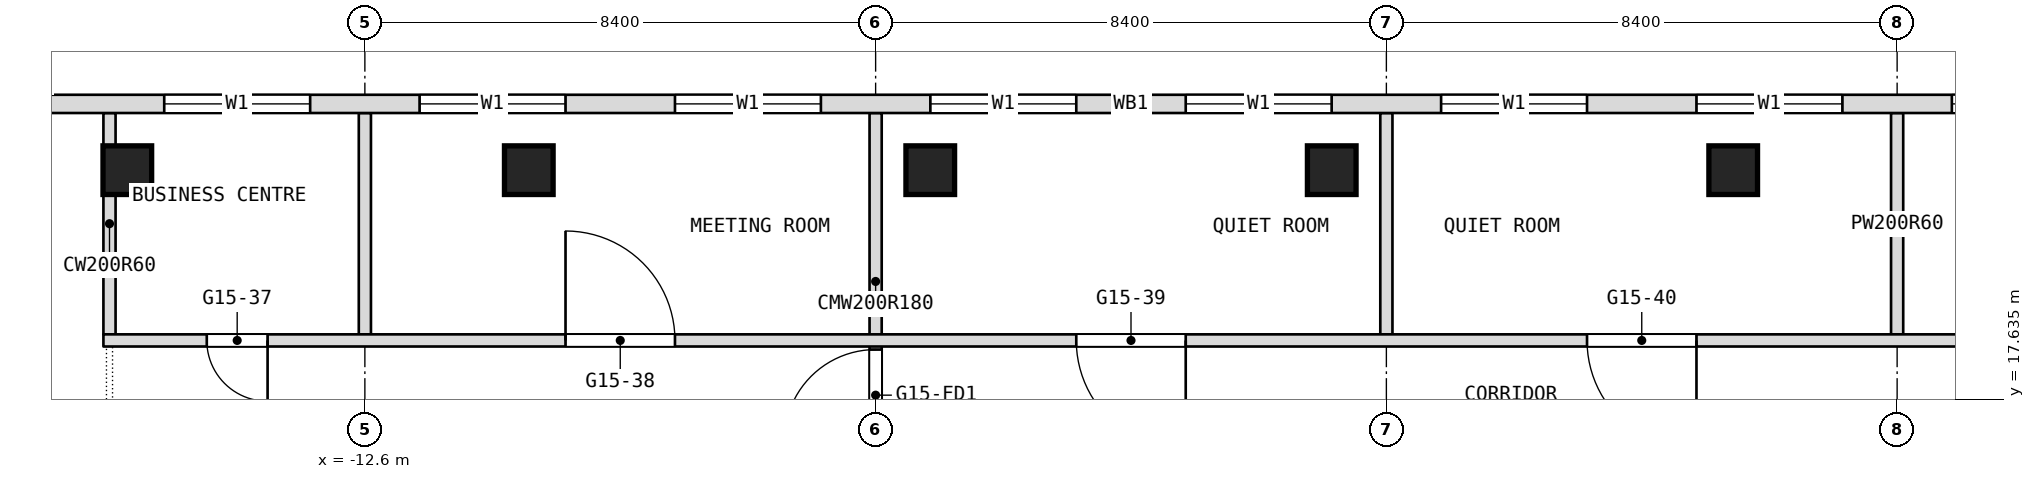
"""IFC4 building model, lengths in metres.
Left out: names, types, materials, properties, quantities, classifications, styles, units other than length and angle.
Written with IfcOpenShell. Run it as: python <this file> out.ifc"""

import sys

from ifc_helpers import new_model, si_unit, direction, frame, frame_2d, origin, origin_2d, place, context, subcontext, project, spatial, rectangle, extrude, element, fill, save


model = new_model("IFC4")
c1 = context("Model", 3, precision=1e-05, world=origin(), true_north=direction((0.0, 1.0)))
c2 = subcontext(c1, "Body", "Model", "MODEL_VIEW")
j1 = project(units=[si_unit("LENGTHUNIT", "METRE"), si_unit("PLANEANGLEUNIT", "RADIAN")], contexts=[c1])
p1 = place(None, origin())
s1 = spatial("IfcSite", under=j1, at=p1, CompositionType="ELEMENT")
p2 = place(p1, origin())
s2 = spatial("IfcBuilding", under=s1, at=p2, CompositionType="ELEMENT")
p3 = place(p2, frame((0.0, 0.0, 187.7)))
s3 = spatial("IfcBuildingStorey", under=s2, at=p3, CompositionType="ELEMENT", Elevation=187.7)
for number, where, z_axis, x_axis in (
    (1, (-16.507, 21.4, 0.0), (0.0, 0.0, 1.0), (1.0, 0.0, 0.0)),
    (2, (-9.904, 21.4, 0.0), (0.0, 0.0, 1.0), (1.0, 0.0, 0.0)),
    (3, (-3.302, 21.4, 0.0), (0.0, 0.0, 1.0), (1.0, 0.0, 0.0)),
    (4, (3.302, 21.4, 0.0), (0.0, 0.0, 1.0), (1.0, 0.0, 0.0)),
    (5, (9.904, 21.4, 0.0), (0.0, 0.0, 1.0), (1.0, 0.0, 0.0)),
):
    element("IfcColumn", number, at=place(p3, frame(where, z_axis=z_axis, x_axis=x_axis)), inside=s3, PredefinedType="COLUMN", context=c2, shape_type="SweptSolid", body=[
        extrude(rectangle(XDim=0.8, YDim=0.8, at=origin_2d()), origin(), (0.0, 0.0, 1.0), 3.6),
    ])
for number, where, z_axis, x_axis in (
    (6, (12.6, 18.7, 0.0), (0.0, 0.0, 1.0), (0.0, 1.0, 0.0)),
    (7, (4.2, 18.7, 0.0), (0.0, 0.0, 1.0), (0.0, 1.0, 0.0)),
):
    element("IfcWall", number, at=place(p3, frame(where, z_axis=z_axis, x_axis=x_axis)), inside=s3, PredefinedType="PARTITIONING", context=c2, shape_type="SweptSolid", body=[
        extrude(rectangle(XDim=3.64, YDim=0.2, at=frame_2d((1.82, 0.0))), origin(), (0.0, 0.0, 1.0), 3.34),
    ])
p4 = place(p3, frame((-4.2, 16.8, 0.0), z_axis=(0.0, 0.0, 1.0), x_axis=(0.0, 1.0, 0.0)))
e8 = element("IfcWall", 8, at=p4, inside=s3, PredefinedType="PARTITIONING", context=c2, shape_type="SweptSolid", body=[
    extrude(rectangle(XDim=5.54, YDim=0.2, at=frame_2d((2.77, 0.0))), origin(), (0.0, 0.0, 1.0), 3.34),
])
p5 = place(p4, frame((0.15, 0.0, 0.0)))
e9 = element("IfcOpeningElement", 9, at=p5, cuts=e8, PredefinedType="OPENING", context=c2, shape_type="SweptSolid", body=[
    extrude(rectangle(XDim=1.5, YDim=2.1, at=frame_2d((0.75, 1.05))), frame((0.0, 0.1, 0.0), z_axis=(0.0, -1.0, 0.0), x_axis=(1.0, 0.0, 0.0)), (0.0, 0.0, 1.0), 0.2),
])
for number, where, z_axis, x_axis in (
    (10, (-12.6, 18.7, 0.0), (0.0, 0.0, 1.0), (0.0, 1.0, 0.0)),
    (11, (-16.8, 18.7, 0.0), (0.0, 0.0, 1.0), (0.0, 1.0, 0.0)),
):
    element("IfcWall", number, at=place(p3, frame(where, z_axis=z_axis, x_axis=x_axis)), inside=s3, PredefinedType="PARTITIONING", context=c2, shape_type="SweptSolid", body=[
        extrude(rectangle(XDim=3.64, YDim=0.2, at=frame_2d((1.82, 0.0))), origin(), (0.0, 0.0, 1.0), 3.34),
    ])
p6 = place(p3, frame((-16.9, 18.6, 0.0), z_axis=(0.0, 0.0, 1.0), x_axis=(1.0, 0.0, 0.0)))
e12 = element("IfcWall", 12, at=p6, inside=s3, PredefinedType="PARTITIONING", context=c2, shape_type="SweptSolid", body=[
    extrude(rectangle(XDim=33.8, YDim=0.2, at=frame_2d((16.9, 0.0))), origin(), (0.0, 0.0, 1.0), 3.34),
])
p7 = place(p6, frame((1.7, 0.0, 0.0)))
e13 = element("IfcOpeningElement", 13, at=p7, cuts=e12, PredefinedType="OPENING", context=c2, shape_type="SweptSolid", body=[
    extrude(rectangle(XDim=1.0, YDim=2.1, at=frame_2d((0.5, 1.05))), frame((0.0, 0.1, 0.0), z_axis=(0.0, -1.0, 0.0), x_axis=(1.0, 0.0, 0.0)), (0.0, 0.0, 1.0), 0.2),
])
p8 = place(p6, frame((7.6, 0.0, 0.0)))
e14 = element("IfcOpeningElement", 14, at=p8, cuts=e12, PredefinedType="OPENING", context=c2, shape_type="SweptSolid", body=[
    extrude(rectangle(XDim=1.8, YDim=2.1, at=frame_2d((0.9, 1.05))), frame((0.0, 0.1, 0.0), z_axis=(0.0, -1.0, 0.0), x_axis=(1.0, 0.0, 0.0)), (0.0, 0.0, 1.0), 0.2),
])
p9 = place(p6, frame((16.0, 0.0, 0.0)))
e15 = element("IfcOpeningElement", 15, at=p9, cuts=e12, PredefinedType="OPENING", context=c2, shape_type="SweptSolid", body=[
    extrude(rectangle(XDim=1.8, YDim=2.1, at=frame_2d((0.9, 1.05))), frame((0.0, 0.1, 0.0), z_axis=(0.0, -1.0, 0.0), x_axis=(1.0, 0.0, 0.0)), (0.0, 0.0, 1.0), 0.2),
])
p10 = place(p6, frame((24.4, 0.0, 0.0)))
e16 = element("IfcOpeningElement", 16, at=p10, cuts=e12, PredefinedType="OPENING", context=c2, shape_type="SweptSolid", body=[
    extrude(rectangle(XDim=1.8, YDim=2.1, at=frame_2d((0.9, 1.05))), frame((0.0, 0.1, 0.0), z_axis=(0.0, -1.0, 0.0), x_axis=(1.0, 0.0, 0.0)), (0.0, 0.0, 1.0), 0.2),
])
p11 = place(p6, frame((31.1, 0.0, 0.0)))
e17 = element("IfcOpeningElement", 17, at=p11, cuts=e12, PredefinedType="OPENING", context=c2, shape_type="SweptSolid", body=[
    extrude(rectangle(XDim=1.0, YDim=2.1, at=frame_2d((0.5, 1.05))), frame((0.0, 0.1, 0.0), z_axis=(0.0, -1.0, 0.0), x_axis=(1.0, 0.0, 0.0)), (0.0, 0.0, 1.0), 0.2),
])
p12 = place(p3, frame((19.206, 22.49, 0.0), z_axis=(0.0, 0.0, 1.0), x_axis=(-1.0, 0.0, 0.0)))
e18 = element("IfcWall", 18, at=p12, inside=s3, PredefinedType="NOTDEFINED", context=c2, shape_type="SweptSolid", body=[
    extrude(rectangle(XDim=38.412, YDim=0.3, at=frame_2d((19.206, 0.0))), origin(), (0.0, 0.0, 1.0), 3.6),
])
p13 = place(p12, frame((3.306, 0.0, 0.9)))
e19 = element("IfcOpeningElement", 19, at=p13, cuts=e18, PredefinedType="OPENING", context=c2, shape_type="SweptSolid", body=[
    extrude(rectangle(XDim=2.4, YDim=2.1, at=frame_2d((1.2, 1.05))), frame((0.0, 0.15, 0.0), z_axis=(0.0, -1.0, 0.0), x_axis=(1.0, 0.0, 0.0)), (0.0, 0.0, 1.0), 0.3),
])
p14 = place(p12, frame((7.506, 0.0, 0.9)))
e20 = element("IfcOpeningElement", 20, at=p14, cuts=e18, PredefinedType="OPENING", context=c2, shape_type="SweptSolid", body=[
    extrude(rectangle(XDim=2.4, YDim=2.1, at=frame_2d((1.2, 1.05))), frame((0.0, 0.15, 0.0), z_axis=(0.0, -1.0, 0.0), x_axis=(1.0, 0.0, 0.0)), (0.0, 0.0, 1.0), 0.3),
])
p15 = place(p12, frame((11.706, 0.0, 0.9)))
e21 = element("IfcOpeningElement", 21, at=p15, cuts=e18, PredefinedType="OPENING", context=c2, shape_type="SweptSolid", body=[
    extrude(rectangle(XDim=2.4, YDim=2.1, at=frame_2d((1.2, 1.05))), frame((0.0, 0.15, 0.0), z_axis=(0.0, -1.0, 0.0), x_axis=(1.0, 0.0, 0.0)), (0.0, 0.0, 1.0), 0.3),
])
p16 = place(p12, frame((15.906, 0.0, 0.9)))
e22 = element("IfcOpeningElement", 22, at=p16, cuts=e18, PredefinedType="OPENING", context=c2, shape_type="SweptSolid", body=[
    extrude(rectangle(XDim=2.4, YDim=2.1, at=frame_2d((1.2, 1.05))), frame((0.0, 0.15, 0.0), z_axis=(0.0, -1.0, 0.0), x_axis=(1.0, 0.0, 0.0)), (0.0, 0.0, 1.0), 0.3),
])
p17 = place(p12, frame((20.106, 0.0, 0.9)))
e23 = element("IfcOpeningElement", 23, at=p17, cuts=e18, PredefinedType="OPENING", context=c2, shape_type="SweptSolid", body=[
    extrude(rectangle(XDim=2.4, YDim=2.1, at=frame_2d((1.2, 1.05))), frame((0.0, 0.15, 0.0), z_axis=(0.0, -1.0, 0.0), x_axis=(1.0, 0.0, 0.0)), (0.0, 0.0, 1.0), 0.3),
])
p18 = place(p12, frame((24.306, 0.0, 0.9)))
e24 = element("IfcOpeningElement", 24, at=p18, cuts=e18, PredefinedType="OPENING", context=c2, shape_type="SweptSolid", body=[
    extrude(rectangle(XDim=2.4, YDim=2.1, at=frame_2d((1.2, 1.05))), frame((0.0, 0.15, 0.0), z_axis=(0.0, -1.0, 0.0), x_axis=(1.0, 0.0, 0.0)), (0.0, 0.0, 1.0), 0.3),
])
p19 = place(p12, frame((28.506, 0.0, 0.9)))
e25 = element("IfcOpeningElement", 25, at=p19, cuts=e18, PredefinedType="OPENING", context=c2, shape_type="SweptSolid", body=[
    extrude(rectangle(XDim=2.4, YDim=2.1, at=frame_2d((1.2, 1.05))), frame((0.0, 0.15, 0.0), z_axis=(0.0, -1.0, 0.0), x_axis=(1.0, 0.0, 0.0)), (0.0, 0.0, 1.0), 0.3),
])
p20 = place(p12, frame((32.706, 0.0, 0.9)))
e26 = element("IfcOpeningElement", 26, at=p20, cuts=e18, PredefinedType="OPENING", context=c2, shape_type="SweptSolid", body=[
    extrude(rectangle(XDim=2.4, YDim=2.1, at=frame_2d((1.2, 1.05))), frame((0.0, 0.15, 0.0), z_axis=(0.0, -1.0, 0.0), x_axis=(1.0, 0.0, 0.0)), (0.0, 0.0, 1.0), 0.3),
])
p21 = place(p7, origin())
e27 = element("IfcDoor", 27, at=p21, inside=s3, OperationType="SINGLE_SWING_LEFT", PredefinedType="DOOR", context=c2, shape_type="SweptSolid", body=[
    extrude(rectangle(XDim=1.0, YDim=2.1, at=frame_2d((0.5, 1.05))), frame((0.0, 0.025, 0.0), z_axis=(0.0, -1.0, 0.0), x_axis=(1.0, 0.0, 0.0)), (0.0, 0.0, 1.0), 0.05),
])
fill(e13, e27)
p22 = place(p8, origin())
e28 = element("IfcDoor", 28, at=p22, inside=s3, OperationType="DOUBLE_DOOR_SINGLE_SWING", PredefinedType="DOOR", context=c2, shape_type="SweptSolid", body=[
    extrude(rectangle(XDim=1.8, YDim=2.1, at=frame_2d((0.9, 1.05))), frame((0.0, 0.025, 0.0), z_axis=(0.0, -1.0, 0.0), x_axis=(1.0, 0.0, 0.0)), (0.0, 0.0, 1.0), 0.05),
])
fill(e14, e28)
p23 = place(p9, origin())
e29 = element("IfcDoor", 29, at=p23, inside=s3, OperationType="DOUBLE_DOOR_SINGLE_SWING", PredefinedType="DOOR", context=c2, shape_type="SweptSolid", body=[
    extrude(rectangle(XDim=1.8, YDim=2.1, at=frame_2d((0.9, 1.05))), frame((0.0, 0.025, 0.0), z_axis=(0.0, -1.0, 0.0), x_axis=(1.0, 0.0, 0.0)), (0.0, 0.0, 1.0), 0.05),
])
fill(e15, e29)
p24 = place(p10, origin())
e30 = element("IfcDoor", 30, at=p24, inside=s3, OperationType="DOUBLE_DOOR_SINGLE_SWING", PredefinedType="DOOR", context=c2, shape_type="SweptSolid", body=[
    extrude(rectangle(XDim=1.8, YDim=2.1, at=frame_2d((0.9, 1.05))), frame((0.0, 0.025, 0.0), z_axis=(0.0, -1.0, 0.0), x_axis=(1.0, 0.0, 0.0)), (0.0, 0.0, 1.0), 0.05),
])
fill(e16, e30)
p25 = place(p13, origin())
e31 = element("IfcWindow", 31, at=p25, inside=s3, PartitioningType="SINGLE_PANEL", PredefinedType="WINDOW", context=c2, shape_type="SweptSolid", body=[
    extrude(rectangle(XDim=2.4, YDim=2.1, at=frame_2d((1.2, 1.05))), frame((0.0, 0.03, 0.0), z_axis=(0.0, -1.0, 0.0), x_axis=(1.0, 0.0, 0.0)), (0.0, 0.0, 1.0), 0.06),
])
fill(e19, e31)
p26 = place(p14, origin())
e32 = element("IfcWindow", 32, at=p26, inside=s3, PartitioningType="SINGLE_PANEL", PredefinedType="WINDOW", context=c2, shape_type="SweptSolid", body=[
    extrude(rectangle(XDim=2.4, YDim=2.1, at=frame_2d((1.2, 1.05))), frame((0.0, 0.03, 0.0), z_axis=(0.0, -1.0, 0.0), x_axis=(1.0, 0.0, 0.0)), (0.0, 0.0, 1.0), 0.06),
])
fill(e20, e32)
p27 = place(p15, origin())
e33 = element("IfcWindow", 33, at=p27, inside=s3, PartitioningType="SINGLE_PANEL", PredefinedType="WINDOW", context=c2, shape_type="SweptSolid", body=[
    extrude(rectangle(XDim=2.4, YDim=2.1, at=frame_2d((1.2, 1.05))), frame((0.0, 0.03, 0.0), z_axis=(0.0, -1.0, 0.0), x_axis=(1.0, 0.0, 0.0)), (0.0, 0.0, 1.0), 0.06),
])
fill(e21, e33)
p28 = place(p16, origin())
e34 = element("IfcWindow", 34, at=p28, inside=s3, PartitioningType="SINGLE_PANEL", PredefinedType="WINDOW", context=c2, shape_type="SweptSolid", body=[
    extrude(rectangle(XDim=2.4, YDim=2.1, at=frame_2d((1.2, 1.05))), frame((0.0, 0.03, 0.0), z_axis=(0.0, -1.0, 0.0), x_axis=(1.0, 0.0, 0.0)), (0.0, 0.0, 1.0), 0.06),
])
fill(e22, e34)
p29 = place(p17, origin())
e35 = element("IfcWindow", 35, at=p29, inside=s3, PartitioningType="SINGLE_PANEL", PredefinedType="WINDOW", context=c2, shape_type="SweptSolid", body=[
    extrude(rectangle(XDim=2.4, YDim=2.1, at=frame_2d((1.2, 1.05))), frame((0.0, 0.03, 0.0), z_axis=(0.0, -1.0, 0.0), x_axis=(1.0, 0.0, 0.0)), (0.0, 0.0, 1.0), 0.06),
])
fill(e23, e35)
p30 = place(p18, origin())
e36 = element("IfcWindow", 36, at=p30, inside=s3, PartitioningType="SINGLE_PANEL", PredefinedType="WINDOW", context=c2, shape_type="SweptSolid", body=[
    extrude(rectangle(XDim=2.4, YDim=2.1, at=frame_2d((1.2, 1.05))), frame((0.0, 0.03, 0.0), z_axis=(0.0, -1.0, 0.0), x_axis=(1.0, 0.0, 0.0)), (0.0, 0.0, 1.0), 0.06),
])
fill(e24, e36)
p31 = place(p19, origin())
e37 = element("IfcWindow", 37, at=p31, inside=s3, PartitioningType="SINGLE_PANEL", PredefinedType="WINDOW", context=c2, shape_type="SweptSolid", body=[
    extrude(rectangle(XDim=2.4, YDim=2.1, at=frame_2d((1.2, 1.05))), frame((0.0, 0.03, 0.0), z_axis=(0.0, -1.0, 0.0), x_axis=(1.0, 0.0, 0.0)), (0.0, 0.0, 1.0), 0.06),
])
fill(e25, e37)
p32 = place(p20, origin())
e38 = element("IfcWindow", 38, at=p32, inside=s3, PartitioningType="SINGLE_PANEL", PredefinedType="WINDOW", context=c2, shape_type="SweptSolid", body=[
    extrude(rectangle(XDim=2.4, YDim=2.1, at=frame_2d((1.2, 1.05))), frame((0.0, 0.03, 0.0), z_axis=(0.0, -1.0, 0.0), x_axis=(1.0, 0.0, 0.0)), (0.0, 0.0, 1.0), 0.06),
])
fill(e26, e38)
p33 = place(p5, origin())
e39 = element("IfcDoor", 39, at=p33, inside=s3, OperationType="DOUBLE_DOOR_DOUBLE_SWING", PredefinedType="DOOR", context=c2, shape_type="SweptSolid", body=[
    extrude(rectangle(XDim=1.5, YDim=2.1, at=frame_2d((0.75, 1.05))), frame((0.0, 0.025, 0.0), z_axis=(0.0, -1.0, 0.0), x_axis=(1.0, 0.0, 0.0)), (0.0, 0.0, 1.0), 0.05),
])
fill(e9, e39)
save(model, sys.argv[1])
